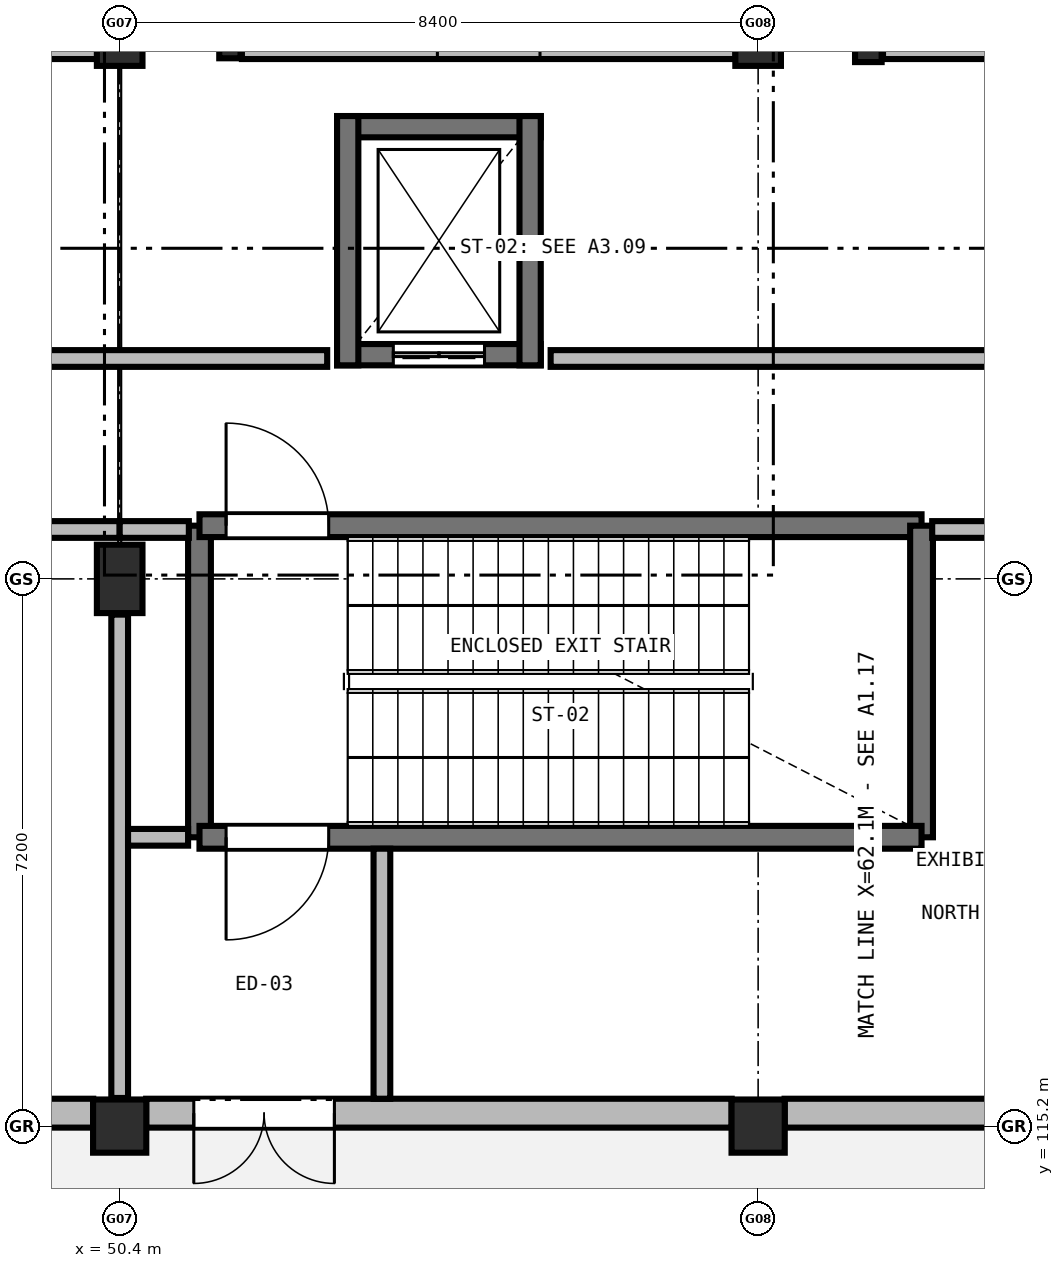
"""IFC4 building model, lengths in metres.
Left out: names, types, materials, properties, quantities, classifications, styles, units other than length and angle.
Written with IfcOpenShell. Run it as: python <this file> out.ifc"""

import sys

from ifc_helpers import new_model, si_unit, direction, frame, frame_2d, origin, origin_2d, place, context, subcontext, project, spatial, rectangle, extrude, element, fill, save


model = new_model("IFC4")
c1 = context("Model", 3, precision=1e-05, world=origin(), true_north=direction((0.0, 1.0)))
c2 = subcontext(c1, "Body", "Model", "MODEL_VIEW")
j1 = project(units=[si_unit("LENGTHUNIT", "METRE"), si_unit("PLANEANGLEUNIT", "RADIAN")], contexts=[c1])
p1 = place(None, origin())
s1 = spatial("IfcSite", under=j1, at=p1, CompositionType="ELEMENT")
p2 = place(p1, origin())
s2 = spatial("IfcBuilding", under=s1, at=p2, CompositionType="ELEMENT")
p3 = place(p2, origin())
s3 = spatial("IfcBuildingStorey", under=s2, at=p3, CompositionType="ELEMENT", Elevation=0.0)
p4 = place(p3, frame((50.4, 115.2, 0.0), z_axis=(0.0, 0.0, 1.0), x_axis=(1.0, 0.0, 0.0)))
e1 = element("IfcColumn", 1, at=p4, inside=s3, PredefinedType="COLUMN", context=c2, shape_type="SweptSolid", body=[
    extrude(rectangle(XDim=0.7, YDim=0.7, at=origin_2d()), origin(), (0.0, 0.0, 1.0), 5.1),
])
for number, where, z_axis, x_axis in (
    (2, (50.4, 122.4, 0.0), (0.0, 0.0, 1.0), (1.0, 0.0, 0.0)),
    (3, (50.4, 129.6, 0.0), (0.0, 0.0, 1.0), (1.0, 0.0, 0.0)),
):
    element("IfcColumn", number, at=place(p3, frame(where, z_axis=z_axis, x_axis=x_axis)), inside=s3, PredefinedType="COLUMN", context=c2, shape_type="SweptSolid", body=[
        extrude(rectangle(XDim=0.6, YDim=0.9, at=origin_2d()), origin(), (0.0, 0.0, 1.0), 5.1),
    ])
p5 = place(p3, frame((58.8, 115.2, 0.0), z_axis=(0.0, 0.0, 1.0), x_axis=(1.0, 0.0, 0.0)))
e4 = element("IfcColumn", 4, at=p5, inside=s3, PredefinedType="COLUMN", context=c2, shape_type="SweptSolid", body=[
    extrude(rectangle(XDim=0.7, YDim=0.7, at=origin_2d()), origin(), (0.0, 0.0, 1.0), 5.1),
])
p6 = place(p3, frame((58.8, 129.6, 0.0), z_axis=(0.0, 0.0, 1.0), x_axis=(1.0, 0.0, 0.0)))
e5 = element("IfcColumn", 5, at=p6, inside=s3, PredefinedType="COLUMN", context=c2, shape_type="SweptSolid", body=[
    extrude(rectangle(XDim=0.6, YDim=0.9, at=origin_2d()), origin(), (0.0, 0.0, 1.0), 5.1),
])
p7 = place(p3, frame((51.85, 129.45, 0.0), z_axis=(0.0, 0.0, 1.0), x_axis=(1.0, 0.0, 0.0)))
e6 = element("IfcColumn", 6, at=p7, inside=s3, PredefinedType="PILASTER", context=c2, shape_type="SweptSolid", body=[
    extrude(rectangle(XDim=0.28, YDim=0.4, at=origin_2d()), origin(), (0.0, 0.0, 1.0), 4.15),
])
p8 = place(p3, frame((60.25, 129.45, 0.0), z_axis=(0.0, 0.0, 1.0), x_axis=(1.0, 0.0, 0.0)))
e7 = element("IfcColumn", 7, at=p8, inside=s3, PredefinedType="PILASTER", context=c2, shape_type="SweptSolid", body=[
    extrude(rectangle(XDim=0.35, YDim=0.5, at=origin_2d()), origin(), (0.0, 0.0, 1.0), 4.15),
])
p9 = place(p3, frame((66.852, 115.37, 0.0), z_axis=(0.0, 0.0, 1.0), x_axis=(-1.0, 0.0, 0.0)))
e8 = element("IfcWall", 8, at=p9, inside=s3, PredefinedType="SOLIDWALL", context=c2, shape_type="SweptSolid", body=[
    extrude(rectangle(XDim=7.704, YDim=0.38, at=frame_2d((3.852, 0.0))), origin(), (0.0, 0.0, 1.0), 4.01),
])
p10 = place(p9, frame((2.752, 0.0, 0.0)))
e9 = element("IfcOpeningElement", 9, at=p10, cuts=e8, PredefinedType="OPENING", context=c2, shape_type="SweptSolid", body=[
    extrude(rectangle(XDim=2.2, YDim=2.4, at=frame_2d((1.1, 1.2))), frame((0.0, 0.2, 0.0), z_axis=(0.0, -1.0, 0.0), x_axis=(1.0, 0.0, 0.0)), (0.0, 0.0, 1.0), 0.4),
])
p11 = place(p3, frame((58.452, 115.37, 0.0), z_axis=(0.0, 0.0, 1.0), x_axis=(-1.0, 0.0, 0.0)))
e10 = element("IfcWall", 10, at=p11, inside=s3, PredefinedType="SOLIDWALL", context=c2, shape_type="SweptSolid", body=[
    extrude(rectangle(XDim=7.704, YDim=0.38, at=frame_2d((3.852, 0.0))), origin(), (0.0, 0.0, 1.0), 4.01),
])
p12 = place(p11, frame((5.227, 0.0, 0.0)))
e11 = element("IfcOpeningElement", 11, at=p12, cuts=e10, PredefinedType="OPENING", context=c2, shape_type="SweptSolid", body=[
    extrude(rectangle(XDim=1.85, YDim=2.3, at=frame_2d((0.925, 1.15))), frame((0.0, 0.2, 0.0), z_axis=(0.0, -1.0, 0.0), x_axis=(1.0, 0.0, 0.0)), (0.0, 0.0, 1.0), 0.4),
])
p13 = place(p3, frame((50.052, 115.37, 0.0), z_axis=(0.0, 0.0, 1.0), x_axis=(-1.0, 0.0, 0.0)))
e12 = element("IfcWall", 12, at=p13, inside=s3, PredefinedType="SOLIDWALL", context=c2, shape_type="SweptSolid", body=[
    extrude(rectangle(XDim=7.704, YDim=0.38, at=frame_2d((3.852, 0.0))), origin(), (0.0, 0.0, 1.0), 4.01),
])
p14 = place(p13, frame((2.752, 0.0, 0.0)))
e13 = element("IfcOpeningElement", 13, at=p14, cuts=e12, PredefinedType="OPENING", context=c2, shape_type="SweptSolid", body=[
    extrude(rectangle(XDim=2.2, YDim=2.4, at=frame_2d((1.1, 1.2))), frame((0.0, 0.2, 0.0), z_axis=(0.0, -1.0, 0.0), x_axis=(1.0, 0.0, 0.0)), (0.0, 0.0, 1.0), 0.4),
])
p15 = place(p3, frame((42.298, 129.43, 0.0), z_axis=(0.0, 0.0, 1.0), x_axis=(1.0, 0.0, 0.0)))
e14 = element("IfcWall", 14, at=p15, inside=s3, PredefinedType="SOLIDWALL", context=c2, shape_type="SweptSolid", body=[
    extrude(rectangle(XDim=7.804, YDim=0.38, at=frame_2d((3.902, 0.0))), origin(), (0.0, 0.0, 1.0), 4.01),
])
p16 = place(p15, frame((1.335, 0.0, 0.95)))
e15 = element("IfcOpeningElement", 15, at=p16, cuts=e14, PredefinedType="OPENING", context=c2, shape_type="SweptSolid", body=[
    extrude(rectangle(XDim=1.9, YDim=1.75, at=frame_2d((0.95, 0.875))), frame((0.0, 0.2, 0.0), z_axis=(0.0, -1.0, 0.0), x_axis=(1.0, 0.0, 0.0)), (0.0, 0.0, 1.0), 0.4),
])
p17 = place(p15, frame((4.569, 0.0, 0.95)))
e16 = element("IfcOpeningElement", 16, at=p17, cuts=e14, PredefinedType="OPENING", context=c2, shape_type="SweptSolid", body=[
    extrude(rectangle(XDim=1.9, YDim=1.75, at=frame_2d((0.95, 0.875))), frame((0.0, 0.2, 0.0), z_axis=(0.0, -1.0, 0.0), x_axis=(1.0, 0.0, 0.0)), (0.0, 0.0, 1.0), 0.4),
])
p18 = place(p3, frame((52.008, 129.43, 0.0), z_axis=(0.0, 0.0, 1.0), x_axis=(1.0, 0.0, 0.0)))
e17 = element("IfcWall", 17, at=p18, inside=s3, PredefinedType="SOLIDWALL", context=c2, shape_type="SweptSolid", body=[
    extrude(rectangle(XDim=6.494, YDim=0.38, at=frame_2d((3.247, 0.0))), origin(), (0.0, 0.0, 1.0), 4.01),
])
p19 = place(p18, frame((2.572, 0.0, 0.95)))
e18 = element("IfcOpeningElement", 18, at=p19, cuts=e17, PredefinedType="OPENING", context=c2, shape_type="SweptSolid", body=[
    extrude(rectangle(XDim=1.35, YDim=1.55, at=frame_2d((0.675, 0.775))), frame((0.0, 0.2, 0.0), z_axis=(0.0, -1.0, 0.0), x_axis=(1.0, 0.0, 0.0)), (0.0, 0.0, 1.0), 0.4),
])
p20 = place(p3, frame((60.443, 129.43, 0.0), z_axis=(0.0, 0.0, 1.0), x_axis=(1.0, 0.0, 0.0)))
e19 = element("IfcWall", 19, at=p20, inside=s3, PredefinedType="SOLIDWALL", context=c2, shape_type="SweptSolid", body=[
    extrude(rectangle(XDim=6.459, YDim=0.38, at=frame_2d((3.229, 0.0))), origin(), (0.0, 0.0, 1.0), 4.01),
])
p21 = place(p20, frame((1.879, 0.0, 0.95)))
e20 = element("IfcOpeningElement", 20, at=p21, cuts=e19, PredefinedType="OPENING", context=c2, shape_type="SweptSolid", body=[
    extrude(rectangle(XDim=2.7, YDim=1.9, at=frame_2d((1.35, 0.95))), frame((0.0, 0.2, 0.0), z_axis=(0.0, -1.0, 0.0), x_axis=(1.0, 0.0, 0.0)), (0.0, 0.0, 1.0), 0.4),
])
p22 = place(p3, frame((51.45, 119.0, 0.0), z_axis=(0.0, 0.0, 1.0), x_axis=(0.0, 1.0, 0.0)))
e21 = element("IfcWall", 21, at=p22, inside=s3, PredefinedType="SHEAR", context=c2, shape_type="SweptSolid", body=[
    extrude(rectangle(XDim=4.1, YDim=0.3, at=frame_2d((2.05, 0.0))), origin(), (0.0, 0.0, 1.0), 4.82),
])
p23 = place(p3, frame((51.45, 123.1, 0.0), z_axis=(0.0, 0.0, 1.0), x_axis=(1.0, 0.0, 0.0)))
e22 = element("IfcWall", 22, at=p23, inside=s3, PredefinedType="SHEAR", context=c2, shape_type="SweptSolid", body=[
    extrude(rectangle(XDim=9.5, YDim=0.3, at=frame_2d((4.75, 0.0))), origin(), (0.0, 0.0, 1.0), 4.82),
])
p24 = place(p23, frame((0.35, 0.0, 0.0)))
e23 = element("IfcOpeningElement", 23, at=p24, cuts=e22, PredefinedType="OPENING", context=c2, shape_type="SweptSolid", body=[
    extrude(rectangle(XDim=1.35, YDim=2.2, at=frame_2d((0.675, 1.1))), frame((0.0, 0.16, 0.0), z_axis=(0.0, -1.0, 0.0), x_axis=(1.0, 0.0, 0.0)), (0.0, 0.0, 1.0), 0.32),
])
p25 = place(p3, frame((60.95, 123.1, 0.0), z_axis=(0.0, 0.0, 1.0), x_axis=(0.0, -1.0, 0.0)))
e24 = element("IfcWall", 24, at=p25, inside=s3, PredefinedType="SHEAR", context=c2, shape_type="SweptSolid", body=[
    extrude(rectangle(XDim=4.1, YDim=0.3, at=frame_2d((2.05, 0.0))), origin(), (0.0, 0.0, 1.0), 4.82),
])
p26 = place(p3, frame((60.95, 119.0, 0.0), z_axis=(0.0, 0.0, 1.0), x_axis=(-1.0, 0.0, 0.0)))
e25 = element("IfcWall", 25, at=p26, inside=s3, PredefinedType="SHEAR", context=c2, shape_type="SweptSolid", body=[
    extrude(rectangle(XDim=9.5, YDim=0.3, at=frame_2d((4.75, 0.0))), origin(), (0.0, 0.0, 1.0), 4.82),
])
p27 = place(p26, frame((7.8, 0.0, 0.0)))
e26 = element("IfcOpeningElement", 26, at=p27, cuts=e25, PredefinedType="OPENING", context=c2, shape_type="SweptSolid", body=[
    extrude(rectangle(XDim=1.35, YDim=2.2, at=frame_2d((0.675, 1.1))), frame((0.0, 0.16, 0.0), z_axis=(0.0, -1.0, 0.0), x_axis=(1.0, 0.0, 0.0)), (0.0, 0.0, 1.0), 0.32),
])
p28 = place(p3, frame((55.94, 125.35, 0.0), z_axis=(0.0, 0.0, 1.0), x_axis=(-1.0, 0.0, 0.0)))
e27 = element("IfcWall", 27, at=p28, inside=s3, PredefinedType="SHEAR", context=c2, shape_type="SweptSolid", body=[
    extrude(rectangle(XDim=2.68, YDim=0.28, at=frame_2d((1.34, 0.0))), origin(), (0.0, 0.0, 1.0), 4.82),
])
p29 = place(p28, frame((0.74, 0.0, 0.0)))
e28 = element("IfcOpeningElement", 28, at=p29, cuts=e27, PredefinedType="OPENING", context=c2, shape_type="SweptSolid", body=[
    extrude(rectangle(XDim=1.2, YDim=2.15, at=frame_2d((0.6, 1.075))), frame((0.0, 0.15, 0.0), z_axis=(0.0, -1.0, 0.0), x_axis=(1.0, 0.0, 0.0)), (0.0, 0.0, 1.0), 0.3),
])
p30 = place(p3, frame((53.26, 128.35, 0.0), z_axis=(0.0, 0.0, 1.0), x_axis=(1.0, 0.0, 0.0)))
e29 = element("IfcWall", 29, at=p30, inside=s3, PredefinedType="SHEAR", context=c2, shape_type="SweptSolid", body=[
    extrude(rectangle(XDim=2.68, YDim=0.28, at=frame_2d((1.34, 0.0))), origin(), (0.0, 0.0, 1.0), 4.82),
])
for number, where, z_axis, x_axis in (
    (30, (53.4, 125.21, 0.0), (0.0, 0.0, 1.0), (0.0, 1.0, 0.0)),
    (31, (55.8, 128.49, 0.0), (0.0, 0.0, 1.0), (0.0, -1.0, 0.0)),
):
    element("IfcWall", number, at=place(p3, frame(where, z_axis=z_axis, x_axis=x_axis)), inside=s3, PredefinedType="SHEAR", context=c2, shape_type="SweptSolid", body=[
        extrude(rectangle(XDim=3.28, YDim=0.28, at=frame_2d((1.64, 0.0))), origin(), (0.0, 0.0, 1.0), 4.82),
    ])
p31 = place(p3, frame((42.0, 125.3, 0.0), z_axis=(0.0, 0.0, 1.0), x_axis=(1.0, 0.0, 0.0)))
e32 = element("IfcWall", 32, at=p31, inside=s3, PredefinedType="SOLIDWALL", context=c2, shape_type="SweptSolid", body=[
    extrude(rectangle(XDim=11.13, YDim=0.22, at=frame_2d((5.565, 0.0))), origin(), (0.0, 0.0, 1.0), 4.105),
])
p32 = place(p31, frame((3.625, 0.0, 0.0)))
e33 = element("IfcOpeningElement", 33, at=p32, cuts=e32, PredefinedType="OPENING", context=c2, shape_type="SweptSolid", body=[
    extrude(rectangle(XDim=1.15, YDim=2.15, at=frame_2d((0.575, 1.075))), frame((0.0, 0.12, 0.0), z_axis=(0.0, -1.0, 0.0), x_axis=(1.0, 0.0, 0.0)), (0.0, 0.0, 1.0), 0.24),
])
p33 = place(p3, frame((56.07, 125.3, 0.0), z_axis=(0.0, 0.0, 1.0), x_axis=(1.0, 0.0, 0.0)))
e34 = element("IfcWall", 34, at=p33, inside=s3, PredefinedType="SOLIDWALL", context=c2, shape_type="SweptSolid", body=[
    extrude(rectangle(XDim=19.53, YDim=0.22, at=frame_2d((9.765, 0.0))), origin(), (0.0, 0.0, 1.0), 4.105),
])
p34 = place(p3, frame((50.4, 123.05, 0.0), z_axis=(0.0, 0.0, 1.0), x_axis=(-1.0, 0.0, 0.0)))
e35 = element("IfcWall", 35, at=p34, inside=s3, PredefinedType="SOLIDWALL", context=c2, shape_type="SweptSolid", body=[
    extrude(rectangle(XDim=8.4, YDim=0.22, at=frame_2d((4.2, 0.0))), origin(), (0.0, 0.0, 1.0), 4.105),
])
p35 = place(p34, frame((3.425, 0.0, 0.0)))
e36 = element("IfcOpeningElement", 36, at=p35, cuts=e35, PredefinedType="OPENING", context=c2, shape_type="SweptSolid", body=[
    extrude(rectangle(XDim=1.55, YDim=2.2, at=frame_2d((0.775, 1.1))), frame((0.0, 0.12, 0.0), z_axis=(0.0, -1.0, 0.0), x_axis=(1.0, 0.0, 0.0)), (0.0, 0.0, 1.0), 0.24),
])
p36 = place(p3, frame((50.4, 115.57, 0.0), z_axis=(0.0, 0.0, 1.0), x_axis=(0.0, 1.0, 0.0)))
e37 = element("IfcWall", 37, at=p36, inside=s3, PredefinedType="SOLIDWALL", context=c2, shape_type="SweptSolid", body=[
    extrude(rectangle(XDim=6.36, YDim=0.22, at=frame_2d((3.18, 0.0))), origin(), (0.0, 0.0, 1.0), 4.005),
])
p37 = place(p3, frame((93.31, 123.05, 0.0), z_axis=(0.0, 0.0, 1.0), x_axis=(-1.0, 0.0, 0.0)))
e38 = element("IfcWall", 38, at=p37, inside=s3, PredefinedType="SOLIDWALL", context=c2, shape_type="SweptSolid", body=[
    extrude(rectangle(XDim=32.22, YDim=0.22, at=frame_2d((16.11, 0.0))), origin(), (0.0, 0.0, 1.0), 4.105),
])
p38 = place(p37, frame((27.61, 0.0, 0.0)))
e39 = element("IfcOpeningElement", 39, at=p38, cuts=e38, PredefinedType="OPENING", context=c2, shape_type="SweptSolid", body=[
    extrude(rectangle(XDim=1.2, YDim=2.15, at=frame_2d((0.6, 1.075))), frame((0.0, 0.12, 0.0), z_axis=(0.0, -1.0, 0.0), x_axis=(1.0, 0.0, 0.0)), (0.0, 0.0, 1.0), 0.24),
])
p39 = place(p3, frame((51.31, 123.05, 0.0), z_axis=(0.0, 0.0, 1.0), x_axis=(-1.0, 0.0, 0.0)))
e40 = element("IfcWall", 40, at=p39, inside=s3, PredefinedType="SOLIDWALL", context=c2, shape_type="SweptSolid", body=[
    extrude(rectangle(XDim=0.91, YDim=0.22, at=frame_2d((0.455, 0.0))), origin(), (0.0, 0.0, 1.0), 4.105),
])
p40 = place(p3, frame((53.85, 115.56, 0.0), z_axis=(0.0, 0.0, 1.0), x_axis=(0.0, 1.0, 0.0)))
e41 = element("IfcWall", 41, at=p40, inside=s3, PredefinedType="SOLIDWALL", context=c2, shape_type="SweptSolid", body=[
    extrude(rectangle(XDim=3.29, YDim=0.22, at=frame_2d((1.645, 0.0))), origin(), (0.0, 0.0, 1.0), 4.005),
])
p41 = place(p3, frame((50.51, 119.0, 0.0), z_axis=(0.0, 0.0, 1.0), x_axis=(1.0, 0.0, 0.0)))
e42 = element("IfcWall", 42, at=p41, inside=s3, PredefinedType="SOLIDWALL", context=c2, shape_type="SweptSolid", body=[
    extrude(rectangle(XDim=0.79, YDim=0.22, at=frame_2d((0.395, 0.0))), origin(), (0.0, 0.0, 1.0), 4.105),
])
p42 = place(p12, origin())
e43 = element("IfcDoor", 43, at=p42, inside=s3, OperationType="DOUBLE_DOOR_SINGLE_SWING", PredefinedType="DOOR", context=c2, shape_type="SweptSolid", body=[
    extrude(rectangle(XDim=1.85, YDim=2.3, at=frame_2d((0.925, 1.15))), frame((0.0, 0.025, 0.0), z_axis=(0.0, -1.0, 0.0), x_axis=(1.0, 0.0, 0.0)), (0.0, 0.0, 1.0), 0.05),
])
fill(e11, e43)
p43 = place(p24, origin())
e44 = element("IfcDoor", 44, at=p43, inside=s3, OperationType="SINGLE_SWING_LEFT", PredefinedType="DOOR", context=c2, shape_type="SweptSolid", body=[
    extrude(rectangle(XDim=1.35, YDim=2.2, at=frame_2d((0.675, 1.1))), frame((0.0, 0.025, 0.0), z_axis=(0.0, -1.0, 0.0), x_axis=(1.0, 0.0, 0.0)), (0.0, 0.0, 1.0), 0.05),
])
fill(e23, e44)
p44 = place(p29, origin())
e45 = element("IfcDoor", 45, at=p44, inside=s3, OperationType="DOUBLE_DOOR_SLIDING", PredefinedType="DOOR", context=c2, shape_type="SweptSolid", body=[
    extrude(rectangle(XDim=1.2, YDim=2.15, at=frame_2d((0.6, 1.075))), frame((0.0, 0.025, 0.0), z_axis=(0.0, -1.0, 0.0), x_axis=(1.0, 0.0, 0.0)), (0.0, 0.0, 1.0), 0.05),
])
fill(e28, e45)
p45 = place(p27, origin())
e46 = element("IfcDoor", 46, at=p45, inside=s3, OperationType="SINGLE_SWING_RIGHT", PredefinedType="DOOR", context=c2, shape_type="SweptSolid", body=[
    extrude(rectangle(XDim=1.35, YDim=2.2, at=frame_2d((0.675, 1.1))), frame((0.0, 0.025, 0.0), z_axis=(0.0, -1.0, 0.0), x_axis=(1.0, 0.0, 0.0)), (0.0, 0.0, 1.0), 0.05),
])
fill(e26, e46)
save(model, sys.argv[1])
